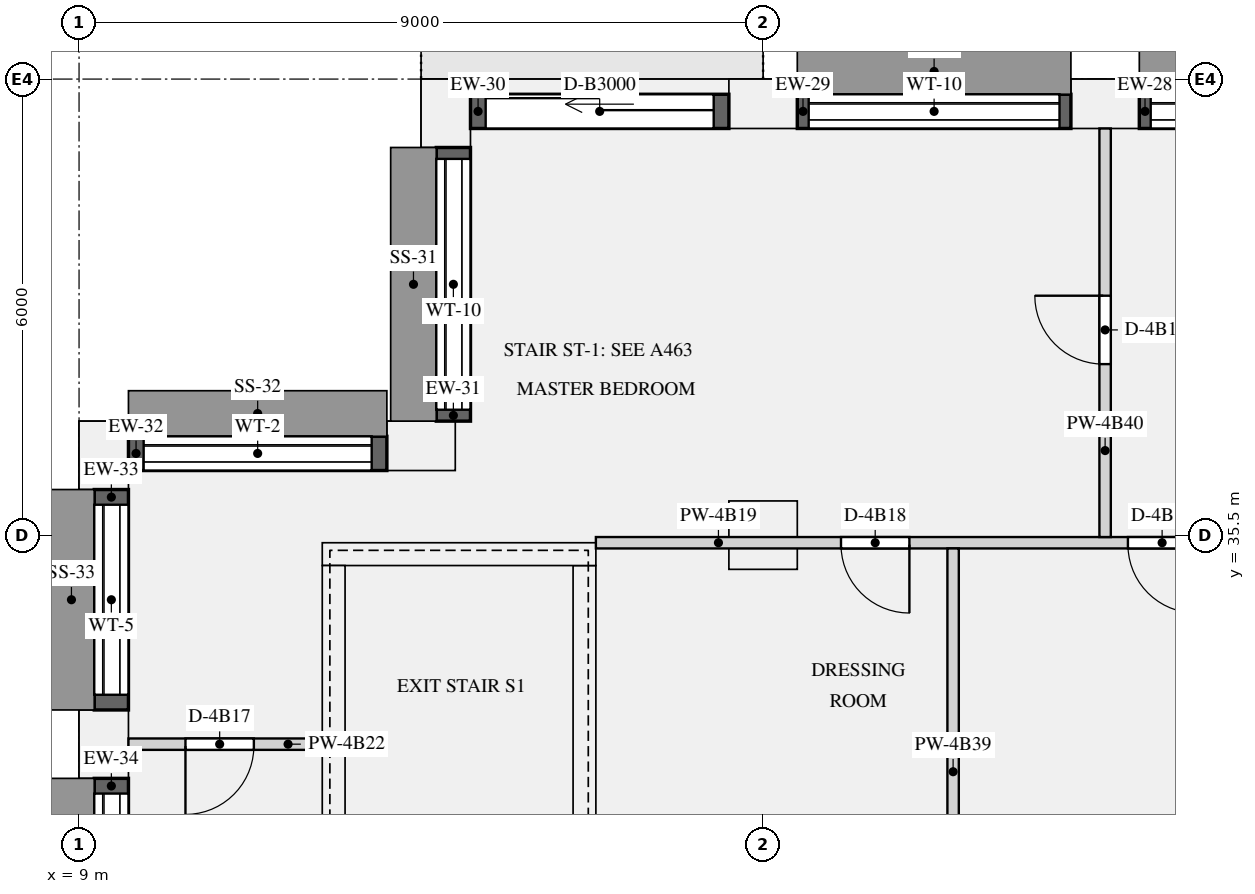
"""IFC4 building model, lengths in metres.
Left out: names, types, materials, properties, quantities, classifications, styles, units other than length and angle.
Written with IfcOpenShell. Run it as: python <this file> out.ifc"""

import sys

from ifc_helpers import new_model, si_unit, direction, frame, frame_2d, origin, origin_2d, place, context, subcontext, project, spatial, rectangle, extrude, element, fill, save


model = new_model("IFC4")
c1 = context("Model", 3, precision=1e-05, world=origin(), true_north=direction((0.0, 1.0)))
c2 = subcontext(c1, "Body", "Model", "MODEL_VIEW")
j1 = project(units=[si_unit("LENGTHUNIT", "METRE"), si_unit("PLANEANGLEUNIT", "RADIAN")], contexts=[c1])
p1 = place(None, origin())
s1 = spatial("IfcSite", under=j1, at=p1, CompositionType="ELEMENT")
p2 = place(p1, origin())
s2 = spatial("IfcBuilding", under=s1, at=p2, CompositionType="ELEMENT")
p3 = place(p2, frame((0.0, 0.0, 207.45)))
s3 = spatial("IfcBuildingStorey", under=s2, at=p3, CompositionType="ELEMENT", Elevation=207.45)
for number, where, z_axis, x_axis in (
    (1, (22.5, 41.175, 0.0), (0.0, 0.0, 1.0), (-1.0, 0.0, 0.0)),
    (2, (18.0, 41.175, 0.0), (0.0, 0.0, 1.0), (-1.0, 0.0, 0.0)),
    (3, (13.825, 41.05, 0.0), (0.0, 0.0, 1.0), (0.0, -1.0, 0.0)),
    (4, (13.5, 36.675, 0.0), (0.0, 0.0, 1.0), (-1.0, 0.0, 0.0)),
    (5, (9.325, 36.55, 0.0), (0.0, 0.0, 1.0), (0.0, -1.0, 0.0)),
    (6, (9.325, 32.75, 0.0), (0.0, 0.0, 1.0), (0.0, -1.0, 0.0)),
):
    element("IfcColumn", number, at=place(p3, frame(where, z_axis=z_axis, x_axis=x_axis)), inside=s3, PredefinedType="USERDEFINED", context=c2, shape_type="SweptSolid", body=[
        extrude(rectangle(XDim=0.9, YDim=0.65, at=origin_2d()), origin(), (0.0, 0.0, 1.0), 3.15),
    ])
p4 = place(p3, frame((18.0, 35.5, 0.0), z_axis=(0.0, 0.0, 1.0), x_axis=(1.0, 0.0, 0.0)))
e7 = element("IfcColumn", 7, at=p4, inside=s3, PredefinedType="COLUMN", context=c2, shape_type="SweptSolid", body=[
    extrude(rectangle(XDim=0.9, YDim=0.9, at=origin_2d()), origin(), (0.0, 0.0, 1.0), 3.15),
])
p5 = place(p3, frame((12.2, 35.25, 0.0), z_axis=(0.0, 0.0, 1.0), x_axis=(1.0, 0.0, 0.0)))
e8 = element("IfcWall", 8, at=p5, inside=s3, PredefinedType="SHEAR", context=c2, shape_type="SweptSolid", body=[
    extrude(rectangle(XDim=3.6, YDim=0.3, at=frame_2d((1.8, 0.0))), origin(), (0.0, 0.0, 1.0), 3.15),
])
for number, where, z_axis, x_axis in (
    (9, (12.35, 27.3, 0.0), (0.0, 0.0, 1.0), (0.0, 1.0, 0.0)),
    (10, (15.65, 27.3, 0.0), (0.0, 0.0, 1.0), (0.0, 1.0, 0.0)),
):
    element("IfcWall", number, at=place(p3, frame(where, z_axis=z_axis, x_axis=x_axis)), inside=s3, PredefinedType="SHEAR", context=c2, shape_type="SweptSolid", body=[
        extrude(rectangle(XDim=7.8, YDim=0.3, at=frame_2d((3.9, 0.0))), origin(), (0.0, 0.0, 1.0), 3.15),
    ])
p6 = place(p3, frame((26.55, 41.075, 0.9), z_axis=(0.0, 0.0, 1.0), x_axis=(-1.0, 0.0, 0.0)))
e11 = element("IfcWall", 11, at=p6, inside=s3, PredefinedType="SOLIDWALL", context=c2, shape_type="SweptSolid", body=[
    extrude(rectangle(XDim=3.6, YDim=0.45, at=frame_2d((1.8, 0.0))), origin(), (0.0, 0.0, 1.0), 1.93),
])
p7 = place(p6, frame((0.15, 0.0, 0.15)))
e12 = element("IfcOpeningElement", 12, at=p7, cuts=e11, PredefinedType="OPENING", context=c2, shape_type="SweptSolid", body=[
    extrude(rectangle(XDim=3.3, YDim=1.5, at=frame_2d((1.65, 0.75))), frame((0.0, 0.235, 0.0), z_axis=(0.0, -1.0, 0.0), x_axis=(1.0, 0.0, 0.0)), (0.0, 0.0, 1.0), 0.47),
])
p8 = place(p3, frame((22.05, 41.075, 0.9), z_axis=(0.0, 0.0, 1.0), x_axis=(-1.0, 0.0, 0.0)))
e13 = element("IfcWall", 13, at=p8, inside=s3, PredefinedType="SOLIDWALL", context=c2, shape_type="SweptSolid", body=[
    extrude(rectangle(XDim=3.6, YDim=0.45, at=frame_2d((1.8, 0.0))), origin(), (0.0, 0.0, 1.0), 1.93),
])
p9 = place(p8, frame((0.15, 0.0, 0.15)))
e14 = element("IfcOpeningElement", 14, at=p9, cuts=e13, PredefinedType="OPENING", context=c2, shape_type="SweptSolid", body=[
    extrude(rectangle(XDim=3.3, YDim=1.5, at=frame_2d((1.65, 0.75))), frame((0.0, 0.235, 0.0), z_axis=(0.0, -1.0, 0.0), x_axis=(1.0, 0.0, 0.0)), (0.0, 0.0, 1.0), 0.47),
])
p10 = place(p3, frame((17.55, 41.075, 0.0), z_axis=(0.0, 0.0, 1.0), x_axis=(-1.0, 0.0, 0.0)))
e15 = element("IfcWall", 15, at=p10, inside=s3, PredefinedType="SOLIDWALL", context=c2, shape_type="SweptSolid", body=[
    extrude(rectangle(XDim=3.4, YDim=0.45, at=frame_2d((1.7, 0.0))), origin(), (0.0, 0.0, 1.0), 2.83),
])
p11 = place(p10, frame((0.2, 0.0, 0.0)))
e16 = element("IfcOpeningElement", 16, at=p11, cuts=e15, PredefinedType="OPENING", context=c2, shape_type="SweptSolid", body=[
    extrude(rectangle(XDim=3.0, YDim=2.3, at=frame_2d((1.5, 1.15))), frame((0.0, 0.235, 0.0), z_axis=(0.0, -1.0, 0.0), x_axis=(1.0, 0.0, 0.0)), (0.0, 0.0, 1.0), 0.47),
])
p12 = place(p3, frame((13.925, 40.6, 0.9), z_axis=(0.0, 0.0, 1.0), x_axis=(0.0, -1.0, 0.0)))
e17 = element("IfcWall", 17, at=p12, inside=s3, PredefinedType="SOLIDWALL", context=c2, shape_type="SweptSolid", body=[
    extrude(rectangle(XDim=3.6, YDim=0.45, at=frame_2d((1.8, 0.0))), origin(), (0.0, 0.0, 1.0), 1.93),
])
p13 = place(p12, frame((0.15, 0.0, 0.15)))
e18 = element("IfcOpeningElement", 18, at=p13, cuts=e17, PredefinedType="OPENING", context=c2, shape_type="SweptSolid", body=[
    extrude(rectangle(XDim=3.3, YDim=1.5, at=frame_2d((1.65, 0.75))), frame((0.0, 0.235, 0.0), z_axis=(0.0, -1.0, 0.0), x_axis=(1.0, 0.0, 0.0)), (0.0, 0.0, 1.0), 0.47),
])
p14 = place(p3, frame((13.05, 36.575, 0.9), z_axis=(0.0, 0.0, 1.0), x_axis=(-1.0, 0.0, 0.0)))
e19 = element("IfcWall", 19, at=p14, inside=s3, PredefinedType="SOLIDWALL", context=c2, shape_type="SweptSolid", body=[
    extrude(rectangle(XDim=3.4, YDim=0.45, at=frame_2d((1.7, 0.0))), origin(), (0.0, 0.0, 1.0), 1.93),
])
p15 = place(p14, frame((0.2, 0.0, 0.15)))
e20 = element("IfcOpeningElement", 20, at=p15, cuts=e19, PredefinedType="OPENING", context=c2, shape_type="SweptSolid", body=[
    extrude(rectangle(XDim=3.0, YDim=1.5, at=frame_2d((1.5, 0.75))), frame((0.0, 0.235, 0.0), z_axis=(0.0, -1.0, 0.0), x_axis=(1.0, 0.0, 0.0)), (0.0, 0.0, 1.0), 0.47),
])
p16 = place(p3, frame((9.425, 36.1, 0.9), z_axis=(0.0, 0.0, 1.0), x_axis=(0.0, -1.0, 0.0)))
e21 = element("IfcWall", 21, at=p16, inside=s3, PredefinedType="SOLIDWALL", context=c2, shape_type="SweptSolid", body=[
    extrude(rectangle(XDim=2.9, YDim=0.45, at=frame_2d((1.45, 0.0))), origin(), (0.0, 0.0, 1.0), 1.93),
])
p17 = place(p16, frame((0.2, 0.0, 0.15)))
e22 = element("IfcOpeningElement", 22, at=p17, cuts=e21, PredefinedType="OPENING", context=c2, shape_type="SweptSolid", body=[
    extrude(rectangle(XDim=2.5, YDim=1.5, at=frame_2d((1.25, 0.75))), frame((0.0, 0.235, 0.0), z_axis=(0.0, -1.0, 0.0), x_axis=(1.0, 0.0, 0.0)), (0.0, 0.0, 1.0), 0.47),
])
p18 = place(p3, frame((9.425, 32.3, 0.9), z_axis=(0.0, 0.0, 1.0), x_axis=(0.0, -1.0, 0.0)))
e23 = element("IfcWall", 23, at=p18, inside=s3, PredefinedType="SOLIDWALL", context=c2, shape_type="SweptSolid", body=[
    extrude(rectangle(XDim=3.15, YDim=0.45, at=frame_2d((1.575, 0.0))), origin(), (0.0, 0.0, 1.0), 1.93),
])
p19 = place(p18, frame((0.2, 0.0, 0.15)))
e24 = element("IfcOpeningElement", 24, at=p19, cuts=e23, PredefinedType="OPENING", context=c2, shape_type="SweptSolid", body=[
    extrude(rectangle(XDim=2.75, YDim=1.5, at=frame_2d((1.375, 0.75))), frame((0.0, 0.235, 0.0), z_axis=(0.0, -1.0, 0.0), x_axis=(1.0, 0.0, 0.0)), (0.0, 0.0, 1.0), 0.47),
])
p20 = place(p3, frame((15.8, 35.4, 0.0), z_axis=(0.0, 0.0, 1.0), x_axis=(1.0, 0.0, 0.0)))
e25 = element("IfcWall", 25, at=p20, inside=s3, PredefinedType="PARTITIONING", context=c2, shape_type="SweptSolid", body=[
    extrude(rectangle(XDim=11.2, YDim=0.15, at=frame_2d((5.6, 0.0))), origin(), (0.0, 0.0, 1.0), 2.83),
])
p21 = place(p20, frame((8.725, 0.0, 0.0)))
e26 = element("IfcOpeningElement", 26, at=p21, cuts=e25, PredefinedType="OPENING", context=c2, shape_type="SweptSolid", body=[
    extrude(rectangle(XDim=1.5, YDim=2.1, at=frame_2d((0.75, 1.05))), frame((0.0, 0.085, 0.0), z_axis=(0.0, -1.0, 0.0), x_axis=(1.0, 0.0, 0.0)), (0.0, 0.0, 1.0), 0.17),
])
p22 = place(p20, frame((7.0, 0.0, 0.0)))
e27 = element("IfcOpeningElement", 27, at=p22, cuts=e25, PredefinedType="OPENING", context=c2, shape_type="SweptSolid", body=[
    extrude(rectangle(XDim=0.9, YDim=2.1, at=frame_2d((0.45, 1.05))), frame((0.0, 0.085, 0.0), z_axis=(0.0, -1.0, 0.0), x_axis=(1.0, 0.0, 0.0)), (0.0, 0.0, 1.0), 0.17),
])
p23 = place(p20, frame((3.225, 0.0, 0.0)))
e28 = element("IfcOpeningElement", 28, at=p23, cuts=e25, PredefinedType="OPENING", context=c2, shape_type="SweptSolid", body=[
    extrude(rectangle(XDim=0.9, YDim=2.1, at=frame_2d((0.45, 1.05))), frame((0.0, 0.085, 0.0), z_axis=(0.0, -1.0, 0.0), x_axis=(1.0, 0.0, 0.0)), (0.0, 0.0, 1.0), 0.17),
])
p24 = place(p3, frame((9.65, 32.75, 0.0), z_axis=(0.0, 0.0, 1.0), x_axis=(1.0, 0.0, 0.0)))
e29 = element("IfcWall", 29, at=p24, inside=s3, PredefinedType="PARTITIONING", context=c2, shape_type="SweptSolid", body=[
    extrude(rectangle(XDim=2.55, YDim=0.15, at=frame_2d((1.275, 0.0))), origin(), (0.0, 0.0, 1.0), 2.83),
])
p25 = place(p24, frame((0.75, 0.0, 0.0)))
e30 = element("IfcOpeningElement", 30, at=p25, cuts=e29, PredefinedType="OPENING", context=c2, shape_type="SweptSolid", body=[
    extrude(rectangle(XDim=0.9, YDim=2.1, at=frame_2d((0.45, 1.05))), frame((0.0, 0.085, 0.0), z_axis=(0.0, -1.0, 0.0), x_axis=(1.0, 0.0, 0.0)), (0.0, 0.0, 1.0), 0.17),
])
p26 = place(p3, frame((20.5, 27.1, 0.0), z_axis=(0.0, 0.0, 1.0), x_axis=(0.0, 1.0, 0.0)))
e31 = element("IfcWall", 31, at=p26, inside=s3, PredefinedType="PARTITIONING", context=c2, shape_type="SweptSolid", body=[
    extrude(rectangle(XDim=8.225, YDim=0.15, at=frame_2d((4.112, 0.0))), origin(), (0.0, 0.0, 1.0), 2.83),
])
p27 = place(p26, frame((1.45, 0.0, 0.0)))
e32 = element("IfcOpeningElement", 32, at=p27, cuts=e31, PredefinedType="OPENING", context=c2, shape_type="SweptSolid", body=[
    extrude(rectangle(XDim=0.9, YDim=2.1, at=frame_2d((0.45, 1.05))), frame((0.0, 0.085, 0.0), z_axis=(0.0, -1.0, 0.0), x_axis=(1.0, 0.0, 0.0)), (0.0, 0.0, 1.0), 0.17),
])
p28 = place(p3, frame((22.5, 35.475, 0.0), z_axis=(0.0, 0.0, 1.0), x_axis=(0.0, 1.0, 0.0)))
e33 = element("IfcWall", 33, at=p28, inside=s3, PredefinedType="PARTITIONING", context=c2, shape_type="SweptSolid", body=[
    extrude(rectangle(XDim=5.375, YDim=0.15, at=frame_2d((2.688, 0.0))), origin(), (0.0, 0.0, 1.0), 2.83),
])
p29 = place(p28, frame((2.275, 0.0, 0.0)))
e34 = element("IfcOpeningElement", 34, at=p29, cuts=e33, PredefinedType="OPENING", context=c2, shape_type="SweptSolid", body=[
    extrude(rectangle(XDim=0.9, YDim=2.1, at=frame_2d((0.45, 1.05))), frame((0.0, 0.085, 0.0), z_axis=(0.0, -1.0, 0.0), x_axis=(1.0, 0.0, 0.0)), (0.0, 0.0, 1.0), 0.17),
])
p30 = place(p7, origin())
e35 = element("IfcWindow", 35, at=p30, inside=s3, PartitioningType="SINGLE_PANEL", PredefinedType="WINDOW", context=c2, shape_type="SweptSolid", body=[
    extrude(rectangle(XDim=3.3, YDim=1.5, at=frame_2d((1.65, 0.75))), frame((0.0, -0.065, 0.0), z_axis=(0.0, -1.0, 0.0), x_axis=(1.0, 0.0, 0.0)), (0.0, 0.0, 1.0), 0.06),
])
fill(e12, e35)
p31 = place(p9, origin())
e36 = element("IfcWindow", 36, at=p31, inside=s3, PartitioningType="SINGLE_PANEL", PredefinedType="WINDOW", context=c2, shape_type="SweptSolid", body=[
    extrude(rectangle(XDim=3.3, YDim=1.5, at=frame_2d((1.65, 0.75))), frame((0.0, -0.065, 0.0), z_axis=(0.0, -1.0, 0.0), x_axis=(1.0, 0.0, 0.0)), (0.0, 0.0, 1.0), 0.06),
])
fill(e14, e36)
p32 = place(p11, origin())
e37 = element("IfcDoor", 37, at=p32, inside=s3, OperationType="SLIDING_TO_LEFT", PredefinedType="DOOR", context=c2, shape_type="SweptSolid", body=[
    extrude(rectangle(XDim=3.0, YDim=2.3, at=frame_2d((1.5, 1.15))), frame((0.0, -0.07, 0.0), z_axis=(0.0, -1.0, 0.0), x_axis=(1.0, 0.0, 0.0)), (0.0, 0.0, 1.0), 0.05),
])
fill(e16, e37)
p33 = place(p13, origin())
e38 = element("IfcWindow", 38, at=p33, inside=s3, PartitioningType="SINGLE_PANEL", PredefinedType="WINDOW", context=c2, shape_type="SweptSolid", body=[
    extrude(rectangle(XDim=3.3, YDim=1.5, at=frame_2d((1.65, 0.75))), frame((0.0, -0.065, 0.0), z_axis=(0.0, -1.0, 0.0), x_axis=(1.0, 0.0, 0.0)), (0.0, 0.0, 1.0), 0.06),
])
fill(e18, e38)
p34 = place(p15, origin())
e39 = element("IfcWindow", 39, at=p34, inside=s3, PartitioningType="SINGLE_PANEL", PredefinedType="WINDOW", context=c2, shape_type="SweptSolid", body=[
    extrude(rectangle(XDim=3.0, YDim=1.5, at=frame_2d((1.5, 0.75))), frame((0.0, -0.065, 0.0), z_axis=(0.0, -1.0, 0.0), x_axis=(1.0, 0.0, 0.0)), (0.0, 0.0, 1.0), 0.06),
])
fill(e20, e39)
p35 = place(p17, origin())
e40 = element("IfcWindow", 40, at=p35, inside=s3, PartitioningType="SINGLE_PANEL", PredefinedType="WINDOW", context=c2, shape_type="SweptSolid", body=[
    extrude(rectangle(XDim=2.5, YDim=1.5, at=frame_2d((1.25, 0.75))), frame((0.0, -0.065, 0.0), z_axis=(0.0, -1.0, 0.0), x_axis=(1.0, 0.0, 0.0)), (0.0, 0.0, 1.0), 0.06),
])
fill(e22, e40)
p36 = place(p19, origin())
e41 = element("IfcWindow", 41, at=p36, inside=s3, PartitioningType="SINGLE_PANEL", PredefinedType="WINDOW", context=c2, shape_type="SweptSolid", body=[
    extrude(rectangle(XDim=2.75, YDim=1.5, at=frame_2d((1.375, 0.75))), frame((0.0, -0.065, 0.0), z_axis=(0.0, -1.0, 0.0), x_axis=(1.0, 0.0, 0.0)), (0.0, 0.0, 1.0), 0.06),
])
fill(e24, e41)
p37 = place(p22, frame((0.9, 0.0, 0.0), z_axis=(0.0, 0.0, 1.0), x_axis=(-1.0, 0.0, 0.0)))
e42 = element("IfcDoor", 42, at=p37, inside=s3, OperationType="SINGLE_SWING_LEFT", PredefinedType="DOOR", context=c2, shape_type="SweptSolid", body=[
    extrude(rectangle(XDim=0.9, YDim=2.1, at=frame_2d((0.45, 1.05))), frame((0.0, 0.025, 0.0), z_axis=(0.0, -1.0, 0.0), x_axis=(1.0, 0.0, 0.0)), (0.0, 0.0, 1.0), 0.05),
])
fill(e27, e42)
p38 = place(p29, origin())
e43 = element("IfcDoor", 43, at=p38, inside=s3, OperationType="SINGLE_SWING_RIGHT", PredefinedType="DOOR", context=c2, shape_type="SweptSolid", body=[
    extrude(rectangle(XDim=0.9, YDim=2.1, at=frame_2d((0.45, 1.05))), frame((0.0, 0.025, 0.0), z_axis=(0.0, -1.0, 0.0), x_axis=(1.0, 0.0, 0.0)), (0.0, 0.0, 1.0), 0.05),
])
fill(e34, e43)
p39 = place(p25, frame((0.9, 0.0, 0.0), z_axis=(0.0, 0.0, 1.0), x_axis=(-1.0, 0.0, 0.0)))
e44 = element("IfcDoor", 44, at=p39, inside=s3, OperationType="SINGLE_SWING_RIGHT", PredefinedType="DOOR", context=c2, shape_type="SweptSolid", body=[
    extrude(rectangle(XDim=0.9, YDim=2.1, at=frame_2d((0.45, 1.05))), frame((0.0, 0.025, 0.0), z_axis=(0.0, -1.0, 0.0), x_axis=(1.0, 0.0, 0.0)), (0.0, 0.0, 1.0), 0.05),
])
fill(e30, e44)
p40 = place(p23, frame((0.9, 0.0, 0.0), z_axis=(0.0, 0.0, 1.0), x_axis=(-1.0, 0.0, 0.0)))
e45 = element("IfcDoor", 45, at=p40, inside=s3, OperationType="SINGLE_SWING_LEFT", PredefinedType="DOOR", context=c2, shape_type="SweptSolid", body=[
    extrude(rectangle(XDim=0.9, YDim=2.1, at=frame_2d((0.45, 1.05))), frame((0.0, 0.025, 0.0), z_axis=(0.0, -1.0, 0.0), x_axis=(1.0, 0.0, 0.0)), (0.0, 0.0, 1.0), 0.05),
])
fill(e28, e45)
save(model, sys.argv[1])
